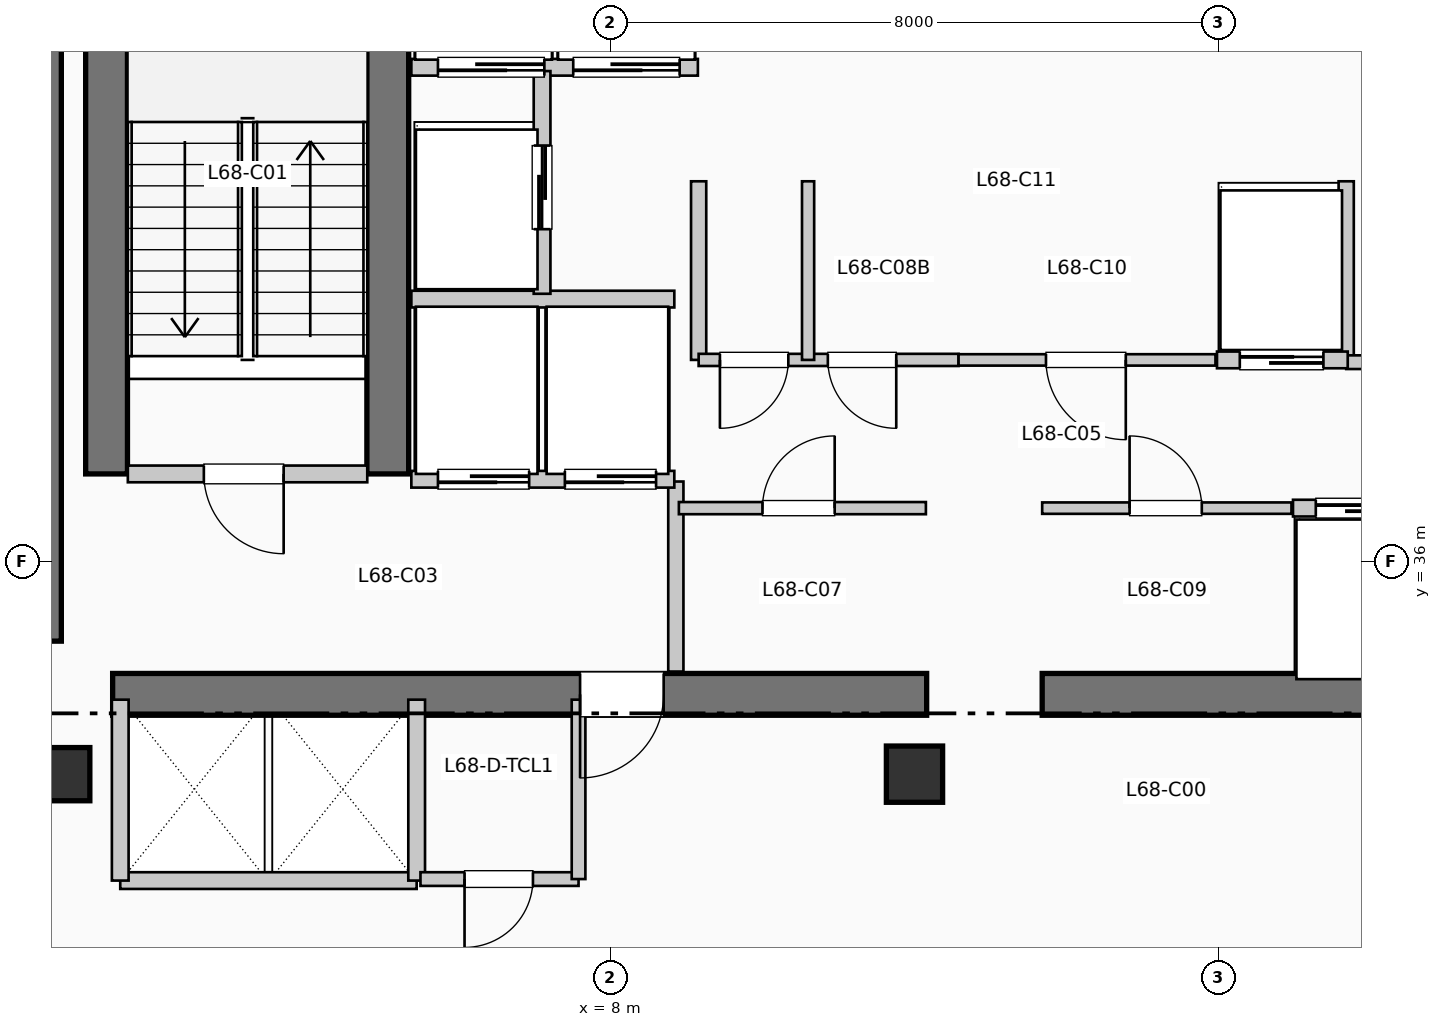
"""IFC4 building model, lengths in metres.
Left out: names, types, materials, properties, quantities, classifications, styles, units other than length and angle.
Written with IfcOpenShell. Run it as: python <this file> out.ifc"""

import sys

from ifc_helpers import new_model, si_unit, direction, frame, frame_2d, origin, origin_2d, place, context, subcontext, project, spatial, rectangle, extrude, element, fill, save


model = new_model("IFC4")
c1 = context("Model", 3, precision=1e-05, world=origin(), true_north=direction((0.0, 1.0)))
c2 = subcontext(c1, "Body", "Model", "MODEL_VIEW")
j1 = project(units=[si_unit("LENGTHUNIT", "METRE"), si_unit("PLANEANGLEUNIT", "RADIAN")], contexts=[c1])
p1 = place(None, origin())
s1 = spatial("IfcSite", under=j1, at=p1, CompositionType="ELEMENT")
p2 = place(p1, origin())
s2 = spatial("IfcBuilding", under=s1, at=p2, CompositionType="ELEMENT")
p3 = place(p2, frame((0.0, 0.0, 280.17)))
s3 = spatial("IfcBuildingStorey", under=s2, at=p3, CompositionType="ELEMENT", Elevation=280.17)
p4 = place(p3, frame((0.5, 34.95, 0.0), z_axis=(0.0, 0.0, 1.0), x_axis=(0.0, 1.0, 0.0)))
e1 = element("IfcWall", 1, at=p4, inside=s3, PredefinedType="SHEAR", context=c2, shape_type="SweptSolid", body=[
    extrude(rectangle(XDim=7.9, YDim=0.55, at=frame_2d((3.95, 0.0))), origin(), (0.0, 0.0, 1.0), 3.96),
])
p5 = place(p3, frame((1.45, 34.25, 0.0), z_axis=(0.0, 0.0, 1.0), x_axis=(1.0, 0.0, 0.0)))
e2 = element("IfcWall", 2, at=p5, inside=s3, PredefinedType="SHEAR", context=c2, shape_type="SweptSolid", body=[
    extrude(rectangle(XDim=10.71, YDim=0.55, at=frame_2d((5.355, 0.0))), origin(), (0.0, 0.0, 1.0), 3.96),
])
p6 = place(p5, frame((7.25, 0.0, 0.0), z_axis=(0.0, 0.0, 1.0), x_axis=(-1.0, 0.0, 0.0)))
e3 = element("IfcOpeningElement", 3, at=p6, cuts=e2, PredefinedType="OPENING", context=c2, shape_type="SweptSolid", body=[
    extrude(rectangle(XDim=1.1, YDim=2.15, at=frame_2d((0.55, 1.075))), frame((0.0, 0.285, 0.0), z_axis=(0.0, -1.0, 0.0), x_axis=(1.0, 0.0, 0.0)), (0.0, 0.0, 1.0), 0.57),
])
p7 = place(p3, frame((13.68, 34.25, 0.0), z_axis=(0.0, 0.0, 1.0), x_axis=(1.0, 0.0, 0.0)))
e4 = element("IfcWall", 4, at=p7, inside=s3, PredefinedType="SHEAR", context=c2, shape_type="SweptSolid", body=[
    extrude(rectangle(XDim=6.12, YDim=0.55, at=frame_2d((3.06, 0.0))), origin(), (0.0, 0.0, 1.0), 3.96),
])
for number, where, z_axis, x_axis in (
    (5, (1.37, 37.15, 0.0), (0.0, 0.0, 1.0), (0.0, 1.0, 0.0)),
    (6, (5.07, 37.15, 0.0), (0.0, 0.0, 1.0), (0.0, 1.0, 0.0)),
):
    element("IfcWall", number, at=place(p3, frame(where, z_axis=z_axis, x_axis=x_axis)), inside=s3, PredefinedType="SHEAR", context=c2, shape_type="SweptSolid", body=[
        extrude(rectangle(XDim=7.89, YDim=0.55, at=frame_2d((3.945, 0.0))), origin(), (0.0, 0.0, 1.0), 3.96),
    ])
p8 = place(p3, frame((0.8, 33.2, 0.0), z_axis=(0.0, 0.0, 1.0), x_axis=(1.0, 0.0, 0.0)))
e7 = element("IfcColumn", 7, at=p8, inside=s3, PredefinedType="COLUMN", context=c2, shape_type="SweptSolid", body=[
    extrude(rectangle(XDim=0.7, YDim=0.7, at=origin_2d()), origin(), (0.0, 0.0, 1.0), 3.96),
])
p9 = place(p3, frame((12.0, 33.2, 0.0), z_axis=(0.0, 0.0, 1.0), x_axis=(1.0, 0.0, 0.0)))
e8 = element("IfcColumn", 8, at=p9, inside=s3, PredefinedType="COLUMN", context=c2, shape_type="SweptSolid", body=[
    extrude(rectangle(XDim=0.74, YDim=0.74, at=origin_2d()), origin(), (0.0, 0.0, 1.0), 3.96),
])
p10 = place(p3, frame((1.65, 37.15, 0.0), z_axis=(0.0, 0.0, 1.0), x_axis=(1.0, 0.0, 0.0)))
e9 = element("IfcWall", 9, at=p10, inside=s3, PredefinedType="PARTITIONING", context=c2, shape_type="SweptSolid", body=[
    extrude(rectangle(XDim=3.15, YDim=0.22, at=frame_2d((1.575, 0.0))), origin(), (0.0, 0.0, 1.0), 3.74),
])
p11 = place(p10, frame((2.05, 0.0, 0.0), z_axis=(0.0, 0.0, 1.0), x_axis=(-1.0, 0.0, 0.0)))
e10 = element("IfcOpeningElement", 10, at=p11, cuts=e9, PredefinedType="OPENING", context=c2, shape_type="SweptSolid", body=[
    extrude(rectangle(XDim=1.05, YDim=2.15, at=frame_2d((0.525, 1.075))), frame((0.0, 0.12, 0.0), z_axis=(0.0, -1.0, 0.0), x_axis=(1.0, 0.0, 0.0)), (0.0, 0.0, 1.0), 0.24),
])
p12 = place(p3, frame((8.86, 34.55, 0.0), z_axis=(0.0, 0.0, 1.0), x_axis=(0.0, 1.0, 0.0)))
e11 = element("IfcWall", 11, at=p12, inside=s3, PredefinedType="PARTITIONING", context=c2, shape_type="SweptSolid", body=[
    extrude(rectangle(XDim=2.5, YDim=0.2, at=frame_2d((1.25, 0.0))), origin(), (0.0, 0.0, 1.0), 3.74),
])
p13 = place(p3, frame((5.38, 37.08, 0.0), z_axis=(0.0, 0.0, 1.0), x_axis=(1.0, 0.0, 0.0)))
e12 = element("IfcWall", 12, at=p13, inside=s3, PredefinedType="PARTITIONING", context=c2, shape_type="SweptSolid", body=[
    extrude(rectangle(XDim=3.46, YDim=0.22, at=frame_2d((1.73, 0.0))), origin(), (0.0, 0.0, 1.0), 3.74),
])
p14 = place(p13, frame((1.55, 0.0, 0.0), z_axis=(0.0, 0.0, 1.0), x_axis=(-1.0, 0.0, 0.0)))
e13 = element("IfcOpeningElement", 13, at=p14, cuts=e12, PredefinedType="OPENING", context=c2, shape_type="SweptSolid", body=[
    extrude(rectangle(XDim=1.2, YDim=2.2, at=frame_2d((0.6, 1.1))), frame((0.0, 0.12, 0.0), z_axis=(0.0, -1.0, 0.0), x_axis=(1.0, 0.0, 0.0)), (0.0, 0.0, 1.0), 0.24),
])
p15 = place(p13, frame((3.22, 0.0, 0.0), z_axis=(0.0, 0.0, 1.0), x_axis=(-1.0, 0.0, 0.0)))
e14 = element("IfcOpeningElement", 14, at=p15, cuts=e12, PredefinedType="OPENING", context=c2, shape_type="SweptSolid", body=[
    extrude(rectangle(XDim=1.2, YDim=2.2, at=frame_2d((0.6, 1.1))), frame((0.0, 0.12, 0.0), z_axis=(0.0, -1.0, 0.0), x_axis=(1.0, 0.0, 0.0)), (0.0, 0.0, 1.0), 0.24),
])
p16 = place(p3, frame((5.38, 39.45, 0.0), z_axis=(0.0, 0.0, 1.0), x_axis=(1.0, 0.0, 0.0)))
e15 = element("IfcWall", 15, at=p16, inside=s3, PredefinedType="PARTITIONING", context=c2, shape_type="SweptSolid", body=[
    extrude(rectangle(XDim=3.46, YDim=0.22, at=frame_2d((1.73, 0.0))), origin(), (0.0, 0.0, 1.0), 3.74),
])
p17 = place(p3, frame((5.38, 42.5, 0.0), z_axis=(0.0, 0.0, 1.0), x_axis=(1.0, 0.0, 0.0)))
e16 = element("IfcWall", 16, at=p17, inside=s3, PredefinedType="PARTITIONING", context=c2, shape_type="SweptSolid", body=[
    extrude(rectangle(XDim=3.77, YDim=0.22, at=frame_2d((1.885, 0.0))), origin(), (0.0, 0.0, 1.0), 3.74),
])
p18 = place(p17, frame((1.75, 0.0, 0.0), z_axis=(0.0, 0.0, 1.0), x_axis=(-1.0, 0.0, 0.0)))
e17 = element("IfcOpeningElement", 17, at=p18, cuts=e16, PredefinedType="OPENING", context=c2, shape_type="SweptSolid", body=[
    extrude(rectangle(XDim=1.4, YDim=2.2, at=frame_2d((0.7, 1.1))), frame((0.0, 0.12, 0.0), z_axis=(0.0, -1.0, 0.0), x_axis=(1.0, 0.0, 0.0)), (0.0, 0.0, 1.0), 0.24),
])
p19 = place(p17, frame((3.53, 0.0, 0.0), z_axis=(0.0, 0.0, 1.0), x_axis=(-1.0, 0.0, 0.0)))
e18 = element("IfcOpeningElement", 18, at=p19, cuts=e16, PredefinedType="OPENING", context=c2, shape_type="SweptSolid", body=[
    extrude(rectangle(XDim=1.4, YDim=2.2, at=frame_2d((0.7, 1.1))), frame((0.0, 0.12, 0.0), z_axis=(0.0, -1.0, 0.0), x_axis=(1.0, 0.0, 0.0)), (0.0, 0.0, 1.0), 0.24),
])
p20 = place(p3, frame((7.1, 39.52, 0.0), z_axis=(0.0, 0.0, 1.0), x_axis=(0.0, 1.0, 0.0)))
e19 = element("IfcWall", 19, at=p20, inside=s3, PredefinedType="PARTITIONING", context=c2, shape_type="SweptSolid", body=[
    extrude(rectangle(XDim=2.93, YDim=0.22, at=frame_2d((1.465, 0.0))), origin(), (0.0, 0.0, 1.0), 3.74),
])
p21 = place(p20, frame((0.85, 0.0, 0.0)))
e20 = element("IfcOpeningElement", 20, at=p21, cuts=e19, PredefinedType="OPENING", context=c2, shape_type="SweptSolid", body=[
    extrude(rectangle(XDim=1.1, YDim=2.2, at=frame_2d((0.55, 1.1))), frame((0.0, 0.12, 0.0), z_axis=(0.0, -1.0, 0.0), x_axis=(1.0, 0.0, 0.0)), (0.0, 0.0, 1.0), 0.24),
])
p22 = place(p3, frame((1.55, 31.8, 0.0), z_axis=(0.0, 0.0, 1.0), x_axis=(1.0, 0.0, 0.0)))
e21 = element("IfcWall", 21, at=p22, inside=s3, PredefinedType="PARTITIONING", context=c2, shape_type="SweptSolid", body=[
    extrude(rectangle(XDim=3.9, YDim=0.22, at=frame_2d((1.95, 0.0))), origin(), (0.0, 0.0, 1.0), 3.74),
])
for number, where, z_axis, x_axis in (
    (22, (1.55, 31.8, 0.0), (0.0, 0.0, 1.0), (0.0, 1.0, 0.0)),
    (23, (5.45, 31.8, 0.0), (0.0, 0.0, 1.0), (0.0, 1.0, 0.0)),
):
    element("IfcWall", number, at=place(p3, frame(where, z_axis=z_axis, x_axis=x_axis)), inside=s3, PredefinedType="PARTITIONING", context=c2, shape_type="SweptSolid", body=[
        extrude(rectangle(XDim=2.38, YDim=0.22, at=frame_2d((1.19, 0.0))), origin(), (0.0, 0.0, 1.0), 3.74),
    ])
for number, where, z_axis, x_axis in (
    (24, (9.16, 38.65, 0.0), (0.0, 0.0, 1.0), (0.0, 1.0, 0.0)),
    (25, (17.68, 38.65, 0.0), (0.0, 0.0, 1.0), (0.0, 1.0, 0.0)),
):
    element("IfcWall", number, at=place(p3, frame(where, z_axis=z_axis, x_axis=x_axis)), inside=s3, PredefinedType="PARTITIONING", context=c2, shape_type="SweptSolid", body=[
        extrude(rectangle(XDim=2.35, YDim=0.2, at=frame_2d((1.175, 0.0))), origin(), (0.0, 0.0, 1.0), 3.74),
    ])
p23 = place(p3, frame((17.68, 38.62, 0.0), z_axis=(0.0, 0.0, 1.0), x_axis=(1.0, 0.0, 0.0)))
e26 = element("IfcWall", 26, at=p23, inside=s3, PredefinedType="PARTITIONING", context=c2, shape_type="SweptSolid", body=[
    extrude(rectangle(XDim=1.84, YDim=0.18, at=frame_2d((0.92, 0.0))), origin(), (0.0, 0.0, 1.0), 3.74),
])
p24 = place(p23, frame((0.24, 0.0, 0.0)))
e27 = element("IfcOpeningElement", 27, at=p24, cuts=e26, PredefinedType="OPENING", context=c2, shape_type="SweptSolid", body=[
    extrude(rectangle(XDim=0.92, YDim=2.1, at=frame_2d((0.46, 1.05))), frame((0.0, 0.1, 0.0), z_axis=(0.0, -1.0, 0.0), x_axis=(1.0, 0.0, 0.0)), (0.0, 0.0, 1.0), 0.2),
])
p25 = place(p3, frame((5.5, 31.82, 0.0), z_axis=(0.0, 0.0, 1.0), x_axis=(1.0, 0.0, 0.0)))
e28 = element("IfcWall", 28, at=p25, inside=s3, PredefinedType="PLUMBINGWALL", context=c2, shape_type="SweptSolid", body=[
    extrude(rectangle(XDim=2.08, YDim=0.18, at=frame_2d((1.04, 0.0))), origin(), (0.0, 0.0, 1.0), 3.74),
])
p26 = place(p25, frame((1.48, 0.0, 0.0), z_axis=(0.0, 0.0, 1.0), x_axis=(-1.0, 0.0, 0.0)))
e29 = element("IfcOpeningElement", 29, at=p26, cuts=e28, PredefinedType="OPENING", context=c2, shape_type="SweptSolid", body=[
    extrude(rectangle(XDim=0.9, YDim=2.1, at=frame_2d((0.45, 1.05))), frame((0.0, 0.1, 0.0), z_axis=(0.0, -1.0, 0.0), x_axis=(1.0, 0.0, 0.0)), (0.0, 0.0, 1.0), 0.2),
])
p27 = place(p3, frame((7.58, 31.82, 0.0), z_axis=(0.0, 0.0, 1.0), x_axis=(0.0, 1.0, 0.0)))
e30 = element("IfcWall", 30, at=p27, inside=s3, PredefinedType="PLUMBINGWALL", context=c2, shape_type="SweptSolid", body=[
    extrude(rectangle(XDim=2.36, YDim=0.18, at=frame_2d((1.18, 0.0))), origin(), (0.0, 0.0, 1.0), 3.74),
])
p28 = place(p3, frame((8.9, 36.7, 0.0), z_axis=(0.0, 0.0, 1.0), x_axis=(1.0, 0.0, 0.0)))
e31 = element("IfcWall", 31, at=p28, inside=s3, PredefinedType="PARTITIONING", context=c2, shape_type="SweptSolid", body=[
    extrude(rectangle(XDim=3.25, YDim=0.16, at=frame_2d((1.625, 0.0))), origin(), (0.0, 0.0, 1.0), 3.74),
])
p29 = place(p28, frame((1.1, 0.0, 0.0)))
e32 = element("IfcOpeningElement", 32, at=p29, cuts=e31, PredefinedType="OPENING", context=c2, shape_type="SweptSolid", body=[
    extrude(rectangle(XDim=0.95, YDim=2.15, at=frame_2d((0.475, 1.075))), frame((0.0, 0.09, 0.0), z_axis=(0.0, -1.0, 0.0), x_axis=(1.0, 0.0, 0.0)), (0.0, 0.0, 1.0), 0.18),
])
p30 = place(p3, frame((9.16, 38.65, 0.0), z_axis=(0.0, 0.0, 1.0), x_axis=(1.0, 0.0, 0.0)))
e33 = element("IfcWall", 33, at=p30, inside=s3, PredefinedType="PARTITIONING", context=c2, shape_type="SweptSolid", body=[
    extrude(rectangle(XDim=3.42, YDim=0.16, at=frame_2d((1.71, 0.0))), origin(), (0.0, 0.0, 1.0), 3.74),
])
p31 = place(p30, frame((1.18, 0.0, 0.0), z_axis=(0.0, 0.0, 1.0), x_axis=(-1.0, 0.0, 0.0)))
e34 = element("IfcOpeningElement", 34, at=p31, cuts=e33, PredefinedType="OPENING", context=c2, shape_type="SweptSolid", body=[
    extrude(rectangle(XDim=0.9, YDim=2.15, at=frame_2d((0.45, 1.075))), frame((0.0, 0.09, 0.0), z_axis=(0.0, -1.0, 0.0), x_axis=(1.0, 0.0, 0.0)), (0.0, 0.0, 1.0), 0.18),
])
p32 = place(p30, frame((2.6, 0.0, 0.0), z_axis=(0.0, 0.0, 1.0), x_axis=(-1.0, 0.0, 0.0)))
e35 = element("IfcOpeningElement", 35, at=p32, cuts=e33, PredefinedType="OPENING", context=c2, shape_type="SweptSolid", body=[
    extrude(rectangle(XDim=0.9, YDim=2.15, at=frame_2d((0.45, 1.075))), frame((0.0, 0.09, 0.0), z_axis=(0.0, -1.0, 0.0), x_axis=(1.0, 0.0, 0.0)), (0.0, 0.0, 1.0), 0.18),
])
p33 = place(p3, frame((10.6, 38.65, 0.0), z_axis=(0.0, 0.0, 1.0), x_axis=(0.0, 1.0, 0.0)))
e36 = element("IfcWall", 36, at=p33, inside=s3, PredefinedType="PARTITIONING", context=c2, shape_type="SweptSolid", body=[
    extrude(rectangle(XDim=2.35, YDim=0.16, at=frame_2d((1.175, 0.0))), origin(), (0.0, 0.0, 1.0), 3.74),
])
p34 = place(p3, frame((13.68, 36.7, 0.0), z_axis=(0.0, 0.0, 1.0), x_axis=(1.0, 0.0, 0.0)))
e37 = element("IfcWall", 37, at=p34, inside=s3, PredefinedType="PARTITIONING", context=c2, shape_type="SweptSolid", body=[
    extrude(rectangle(XDim=3.28, YDim=0.15, at=frame_2d((1.64, 0.0))), origin(), (0.0, 0.0, 1.0), 3.74),
])
p35 = place(p34, frame((1.15, 0.0, 0.0)))
e38 = element("IfcOpeningElement", 38, at=p35, cuts=e37, PredefinedType="OPENING", context=c2, shape_type="SweptSolid", body=[
    extrude(rectangle(XDim=0.95, YDim=2.15, at=frame_2d((0.475, 1.075))), frame((0.0, 0.085, 0.0), z_axis=(0.0, -1.0, 0.0), x_axis=(1.0, 0.0, 0.0)), (0.0, 0.0, 1.0), 0.17),
])
p36 = place(p3, frame((12.58, 38.65, 0.0), z_axis=(0.0, 0.0, 1.0), x_axis=(1.0, 0.0, 0.0)))
e39 = element("IfcWall", 39, at=p36, inside=s3, PredefinedType="PARTITIONING", context=c2, shape_type="SweptSolid", body=[
    extrude(rectangle(XDim=3.38, YDim=0.15, at=frame_2d((1.69, 0.0))), origin(), (0.0, 0.0, 1.0), 3.74),
])
p37 = place(p36, frame((2.2, 0.0, 0.0), z_axis=(0.0, 0.0, 1.0), x_axis=(-1.0, 0.0, 0.0)))
e40 = element("IfcOpeningElement", 40, at=p37, cuts=e39, PredefinedType="OPENING", context=c2, shape_type="SweptSolid", body=[
    extrude(rectangle(XDim=1.05, YDim=2.15, at=frame_2d((0.525, 1.075))), frame((0.0, 0.085, 0.0), z_axis=(0.0, -1.0, 0.0), x_axis=(1.0, 0.0, 0.0)), (0.0, 0.0, 1.0), 0.17),
])
p38 = place(p3, frame((16.98, 36.7, 0.0), z_axis=(0.0, 0.0, 1.0), x_axis=(1.0, 0.0, 0.0)))
e41 = element("IfcWall", 41, at=p38, inside=s3, PredefinedType="PARTITIONING", context=c2, shape_type="SweptSolid", body=[
    extrude(rectangle(XDim=1.7, YDim=0.22, at=frame_2d((0.85, 0.0))), origin(), (0.0, 0.0, 1.0), 3.74),
])
p39 = place(p38, frame((0.3, 0.0, 0.0)))
e42 = element("IfcOpeningElement", 42, at=p39, cuts=e41, PredefinedType="OPENING", context=c2, shape_type="SweptSolid", body=[
    extrude(rectangle(XDim=1.1, YDim=2.2, at=frame_2d((0.55, 1.1))), frame((0.0, 0.12, 0.0), z_axis=(0.0, -1.0, 0.0), x_axis=(1.0, 0.0, 0.0)), (0.0, 0.0, 1.0), 0.24),
])
p40 = place(p3, frame((15.98, 38.65, 0.0), z_axis=(0.0, 0.0, 1.0), x_axis=(1.0, 0.0, 0.0)))
e43 = element("IfcWall", 43, at=p40, inside=s3, PredefinedType="PARTITIONING", context=c2, shape_type="SweptSolid", body=[
    extrude(rectangle(XDim=1.72, YDim=0.22, at=frame_2d((0.86, 0.0))), origin(), (0.0, 0.0, 1.0), 3.74),
])
p41 = place(p40, frame((0.3, 0.0, 0.0)))
e44 = element("IfcOpeningElement", 44, at=p41, cuts=e43, PredefinedType="OPENING", context=c2, shape_type="SweptSolid", body=[
    extrude(rectangle(XDim=1.1, YDim=2.2, at=frame_2d((0.55, 1.1))), frame((0.0, 0.12, 0.0), z_axis=(0.0, -1.0, 0.0), x_axis=(1.0, 0.0, 0.0)), (0.0, 0.0, 1.0), 0.24),
])
p42 = place(p11, origin())
e45 = element("IfcDoor", 45, at=p42, inside=s3, OperationType="SINGLE_SWING_RIGHT", PredefinedType="DOOR", context=c2, shape_type="SweptSolid", body=[
    extrude(rectangle(XDim=1.05, YDim=2.15, at=frame_2d((0.525, 1.075))), frame((0.0, 0.025, 0.0), z_axis=(0.0, -1.0, 0.0), x_axis=(1.0, 0.0, 0.0)), (0.0, 0.0, 1.0), 0.05),
])
fill(e10, e45)
p43 = place(p6, origin())
e46 = element("IfcDoor", 46, at=p43, inside=s3, OperationType="SINGLE_SWING_LEFT", PredefinedType="DOOR", context=c2, shape_type="SweptSolid", body=[
    extrude(rectangle(XDim=1.1, YDim=2.15, at=frame_2d((0.55, 1.075))), frame((0.0, 0.025, 0.0), z_axis=(0.0, -1.0, 0.0), x_axis=(1.0, 0.0, 0.0)), (0.0, 0.0, 1.0), 0.05),
])
fill(e3, e46)
p44 = place(p14, origin())
e47 = element("IfcDoor", 47, at=p44, inside=s3, OperationType="SLIDING_TO_RIGHT", PredefinedType="DOOR", context=c2, shape_type="SweptSolid", body=[
    extrude(rectangle(XDim=1.2, YDim=2.2, at=frame_2d((0.6, 1.1))), frame((0.0, 0.025, 0.0), z_axis=(0.0, -1.0, 0.0), x_axis=(1.0, 0.0, 0.0)), (0.0, 0.0, 1.0), 0.05),
])
fill(e13, e47)
p45 = place(p15, origin())
e48 = element("IfcDoor", 48, at=p45, inside=s3, OperationType="SLIDING_TO_RIGHT", PredefinedType="DOOR", context=c2, shape_type="SweptSolid", body=[
    extrude(rectangle(XDim=1.2, YDim=2.2, at=frame_2d((0.6, 1.1))), frame((0.0, 0.025, 0.0), z_axis=(0.0, -1.0, 0.0), x_axis=(1.0, 0.0, 0.0)), (0.0, 0.0, 1.0), 0.05),
])
fill(e14, e48)
p46 = place(p18, origin())
e49 = element("IfcDoor", 49, at=p46, inside=s3, OperationType="SLIDING_TO_LEFT", PredefinedType="DOOR", context=c2, shape_type="SweptSolid", body=[
    extrude(rectangle(XDim=1.4, YDim=2.2, at=frame_2d((0.7, 1.1))), frame((0.0, 0.025, 0.0), z_axis=(0.0, -1.0, 0.0), x_axis=(1.0, 0.0, 0.0)), (0.0, 0.0, 1.0), 0.05),
])
fill(e17, e49)
p47 = place(p19, origin())
e50 = element("IfcDoor", 50, at=p47, inside=s3, OperationType="SLIDING_TO_LEFT", PredefinedType="DOOR", context=c2, shape_type="SweptSolid", body=[
    extrude(rectangle(XDim=1.4, YDim=2.2, at=frame_2d((0.7, 1.1))), frame((0.0, 0.025, 0.0), z_axis=(0.0, -1.0, 0.0), x_axis=(1.0, 0.0, 0.0)), (0.0, 0.0, 1.0), 0.05),
])
fill(e18, e50)
p48 = place(p21, origin())
e51 = element("IfcDoor", 51, at=p48, inside=s3, OperationType="SLIDING_TO_LEFT", PredefinedType="DOOR", context=c2, shape_type="SweptSolid", body=[
    extrude(rectangle(XDim=1.1, YDim=2.2, at=frame_2d((0.55, 1.1))), frame((0.0, 0.025, 0.0), z_axis=(0.0, -1.0, 0.0), x_axis=(1.0, 0.0, 0.0)), (0.0, 0.0, 1.0), 0.05),
])
fill(e20, e51)
p49 = place(p26, origin())
e52 = element("IfcDoor", 52, at=p49, inside=s3, OperationType="SINGLE_SWING_LEFT", PredefinedType="DOOR", context=c2, shape_type="SweptSolid", body=[
    extrude(rectangle(XDim=0.9, YDim=2.1, at=frame_2d((0.45, 1.05))), frame((0.0, 0.025, 0.0), z_axis=(0.0, -1.0, 0.0), x_axis=(1.0, 0.0, 0.0)), (0.0, 0.0, 1.0), 0.05),
])
fill(e29, e52)
p50 = place(p29, origin())
e53 = element("IfcDoor", 53, at=p50, inside=s3, OperationType="SINGLE_SWING_RIGHT", PredefinedType="DOOR", context=c2, shape_type="SweptSolid", body=[
    extrude(rectangle(XDim=0.95, YDim=2.15, at=frame_2d((0.475, 1.075))), frame((0.0, 0.025, 0.0), z_axis=(0.0, -1.0, 0.0), x_axis=(1.0, 0.0, 0.0)), (0.0, 0.0, 1.0), 0.05),
])
fill(e32, e53)
p51 = place(p31, origin())
e54 = element("IfcDoor", 54, at=p51, inside=s3, OperationType="SINGLE_SWING_LEFT", PredefinedType="DOOR", context=c2, shape_type="SweptSolid", body=[
    extrude(rectangle(XDim=0.9, YDim=2.15, at=frame_2d((0.45, 1.075))), frame((0.0, 0.025, 0.0), z_axis=(0.0, -1.0, 0.0), x_axis=(1.0, 0.0, 0.0)), (0.0, 0.0, 1.0), 0.05),
])
fill(e34, e54)
p52 = place(p32, origin())
e55 = element("IfcDoor", 55, at=p52, inside=s3, OperationType="SINGLE_SWING_RIGHT", PredefinedType="DOOR", context=c2, shape_type="SweptSolid", body=[
    extrude(rectangle(XDim=0.9, YDim=2.15, at=frame_2d((0.45, 1.075))), frame((0.0, 0.025, 0.0), z_axis=(0.0, -1.0, 0.0), x_axis=(1.0, 0.0, 0.0)), (0.0, 0.0, 1.0), 0.05),
])
fill(e35, e55)
p53 = place(p35, origin())
e56 = element("IfcDoor", 56, at=p53, inside=s3, OperationType="SINGLE_SWING_LEFT", PredefinedType="DOOR", context=c2, shape_type="SweptSolid", body=[
    extrude(rectangle(XDim=0.95, YDim=2.15, at=frame_2d((0.475, 1.075))), frame((0.0, 0.025, 0.0), z_axis=(0.0, -1.0, 0.0), x_axis=(1.0, 0.0, 0.0)), (0.0, 0.0, 1.0), 0.05),
])
fill(e38, e56)
p54 = place(p37, origin())
e57 = element("IfcDoor", 57, at=p54, inside=s3, OperationType="SINGLE_SWING_RIGHT", PredefinedType="DOOR", context=c2, shape_type="SweptSolid", body=[
    extrude(rectangle(XDim=1.05, YDim=2.15, at=frame_2d((0.525, 1.075))), frame((0.0, 0.025, 0.0), z_axis=(0.0, -1.0, 0.0), x_axis=(1.0, 0.0, 0.0)), (0.0, 0.0, 1.0), 0.05),
])
fill(e40, e57)
p55 = place(p39, origin())
e58 = element("IfcDoor", 58, at=p55, inside=s3, OperationType="SLIDING_TO_LEFT", PredefinedType="DOOR", context=c2, shape_type="SweptSolid", body=[
    extrude(rectangle(XDim=1.1, YDim=2.2, at=frame_2d((0.55, 1.1))), frame((0.0, 0.025, 0.0), z_axis=(0.0, -1.0, 0.0), x_axis=(1.0, 0.0, 0.0)), (0.0, 0.0, 1.0), 0.05),
])
fill(e42, e58)
p56 = place(p41, origin())
e59 = element("IfcDoor", 59, at=p56, inside=s3, OperationType="SLIDING_TO_LEFT", PredefinedType="DOOR", context=c2, shape_type="SweptSolid", body=[
    extrude(rectangle(XDim=1.1, YDim=2.2, at=frame_2d((0.55, 1.1))), frame((0.0, 0.025, 0.0), z_axis=(0.0, -1.0, 0.0), x_axis=(1.0, 0.0, 0.0)), (0.0, 0.0, 1.0), 0.05),
])
fill(e44, e59)
save(model, sys.argv[1])
